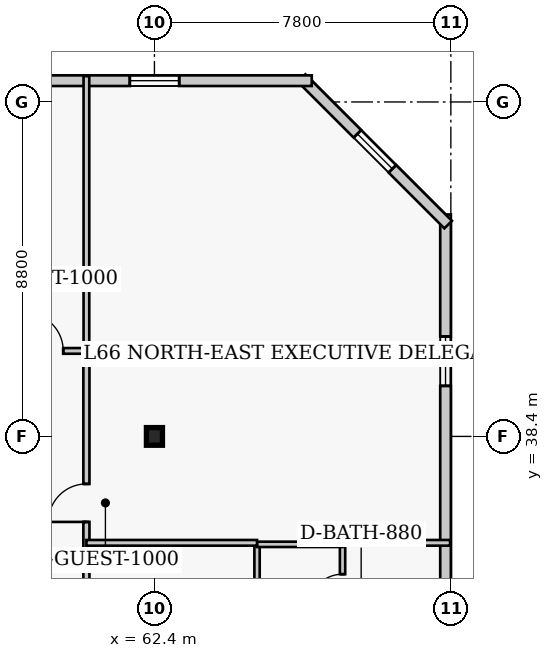
"""IFC4 building model, lengths in metres.
Left out: names, types, materials, properties, quantities, classifications, styles, units other than length and angle.
Written with IfcOpenShell. Run it as: python <this file> out.ifc"""

import sys

from ifc_helpers import new_model, si_unit, direction, frame, frame_2d, origin, origin_2d, place, context, subcontext, project, spatial, rectangle, i_section, extrude, element, fill, save


model = new_model("IFC4")
c1 = context("Model", 3, precision=1e-05, world=origin(), true_north=direction((0.0, 1.0)))
c2 = subcontext(c1, "Body", "Model", "MODEL_VIEW")
j1 = project(units=[si_unit("LENGTHUNIT", "METRE"), si_unit("PLANEANGLEUNIT", "RADIAN")], contexts=[c1])
p1 = place(None, origin())
s1 = spatial("IfcSite", under=j1, at=p1, CompositionType="ELEMENT")
p2 = place(p1, origin())
s2 = spatial("IfcBuilding", under=s1, at=p2, CompositionType="ELEMENT")
p3 = place(p2, frame((0.0, 0.0, 265.4)))
s3 = spatial("IfcBuildingStorey", under=s2, at=p3, CompositionType="ELEMENT", Elevation=265.4)
p4 = place(p3, frame((62.4, 38.4, 0.0), z_axis=(0.0, 0.0, 1.0), x_axis=(1.0, 0.0, 0.0)))
e1 = element("IfcColumn", 1, at=p4, inside=s3, PredefinedType="COLUMN", context=c2, shape_type="SweptSolid", body=[
    extrude(i_section(OverallWidth=0.422, OverallDepth=0.465, WebThickness=0.045, FlangeThickness=0.073, FilletRadius=0.017, at=origin_2d()), origin(), (0.0, 0.0, 1.0), 4.0),
])
p5 = place(p3, frame((70.06, 13.36, 0.0), z_axis=(0.0, 0.0, 1.0), x_axis=(0.0, 1.0, 0.0)))
e2 = element("IfcWall", 2, at=p5, inside=s3, PredefinedType="SOLIDWALL", context=c2, shape_type="SweptSolid", body=[
    extrude(rectangle(XDim=30.88, YDim=0.28, at=frame_2d((15.44, 0.0))), origin(), (0.0, 0.0, 1.0), 3.76),
])
p6 = place(p5, frame((3.21, 0.0, 0.85)))
e3 = element("IfcOpeningElement", 3, at=p6, cuts=e2, PredefinedType="OPENING", context=c2, shape_type="SweptSolid", body=[
    extrude(rectangle(XDim=1.3, YDim=1.7, at=frame_2d((0.65, 0.85))), frame((0.0, 0.15, 0.0), z_axis=(0.0, -1.0, 0.0), x_axis=(1.0, 0.0, 0.0)), (0.0, 0.0, 1.0), 0.3),
])
p7 = place(p5, frame((11.58, 0.0, 0.85)))
e4 = element("IfcOpeningElement", 4, at=p7, cuts=e2, PredefinedType="OPENING", context=c2, shape_type="SweptSolid", body=[
    extrude(rectangle(XDim=1.3, YDim=1.7, at=frame_2d((0.65, 0.85))), frame((0.0, 0.15, 0.0), z_axis=(0.0, -1.0, 0.0), x_axis=(1.0, 0.0, 0.0)), (0.0, 0.0, 1.0), 0.3),
])
p8 = place(p5, frame((18.65, 0.0, 0.85)))
e5 = element("IfcOpeningElement", 5, at=p8, cuts=e2, PredefinedType="OPENING", context=c2, shape_type="SweptSolid", body=[
    extrude(rectangle(XDim=1.3, YDim=1.7, at=frame_2d((0.65, 0.85))), frame((0.0, 0.15, 0.0), z_axis=(0.0, -1.0, 0.0), x_axis=(1.0, 0.0, 0.0)), (0.0, 0.0, 1.0), 0.3),
])
p9 = place(p5, frame((26.37, 0.0, 0.85)))
e6 = element("IfcOpeningElement", 6, at=p9, cuts=e2, PredefinedType="OPENING", context=c2, shape_type="SweptSolid", body=[
    extrude(rectangle(XDim=1.3, YDim=1.7, at=frame_2d((0.65, 0.85))), frame((0.0, 0.15, 0.0), z_axis=(0.0, -1.0, 0.0), x_axis=(1.0, 0.0, 0.0)), (0.0, 0.0, 1.0), 0.3),
])
p10 = place(p3, frame((70.129, 43.973, 0.0), z_axis=(0.0, 0.0, 1.0), x_axis=(-0.707106781187, 0.707106781187, 0.0)))
e7 = element("IfcWall", 7, at=p10, inside=s3, PredefinedType="SOLIDWALL", context=c2, shape_type="SweptSolid", body=[
    extrude(rectangle(XDim=5.454, YDim=0.28, at=frame_2d((2.727, 0.0))), origin(), (0.0, 0.0, 1.0), 3.76),
])
p11 = place(p10, frame((2.077, 0.0, 0.85)))
e8 = element("IfcOpeningElement", 8, at=p11, cuts=e7, PredefinedType="OPENING", context=c2, shape_type="SweptSolid", body=[
    extrude(rectangle(XDim=1.3, YDim=1.7, at=frame_2d((0.65, 0.85))), frame((0.0, 0.15, 0.0), z_axis=(0.0, -1.0, 0.0), x_axis=(1.0, 0.0, 0.0)), (0.0, 0.0, 1.0), 0.3),
])
p12 = place(p3, frame((66.54, 47.76, 0.0), z_axis=(0.0, 0.0, 1.0), x_axis=(-1.0, 0.0, 0.0)))
e9 = element("IfcWall", 9, at=p12, inside=s3, PredefinedType="SOLIDWALL", context=c2, shape_type="SweptSolid", body=[
    extrude(rectangle(XDim=24.83, YDim=0.28, at=frame_2d((12.415, 0.0))), origin(), (0.0, 0.0, 1.0), 3.76),
])
p13 = place(p12, frame((3.488, 0.0, 0.85)))
e10 = element("IfcOpeningElement", 10, at=p13, cuts=e9, PredefinedType="OPENING", context=c2, shape_type="SweptSolid", body=[
    extrude(rectangle(XDim=1.3, YDim=1.7, at=frame_2d((0.65, 0.85))), frame((0.0, 0.15, 0.0), z_axis=(0.0, -1.0, 0.0), x_axis=(1.0, 0.0, 0.0)), (0.0, 0.0, 1.0), 0.3),
])
p14 = place(p12, frame((12.915, 0.0, 0.85)))
e11 = element("IfcOpeningElement", 11, at=p14, cuts=e9, PredefinedType="OPENING", context=c2, shape_type="SweptSolid", body=[
    extrude(rectangle(XDim=1.3, YDim=1.7, at=frame_2d((0.65, 0.85))), frame((0.0, 0.15, 0.0), z_axis=(0.0, -1.0, 0.0), x_axis=(1.0, 0.0, 0.0)), (0.0, 0.0, 1.0), 0.3),
])
p15 = place(p12, frame((20.692, 0.0, 0.85)))
e12 = element("IfcOpeningElement", 12, at=p15, cuts=e9, PredefinedType="OPENING", context=c2, shape_type="SweptSolid", body=[
    extrude(rectangle(XDim=1.3, YDim=1.7, at=frame_2d((0.65, 0.85))), frame((0.0, 0.15, 0.0), z_axis=(0.0, -1.0, 0.0), x_axis=(1.0, 0.0, 0.0)), (0.0, 0.0, 1.0), 0.3),
])
p16 = place(p3, frame((60.61, 24.25, 0.0), z_axis=(0.0, 0.0, 1.0), x_axis=(0.0, 1.0, 0.0)))
e13 = element("IfcWall", 13, at=p16, inside=s3, PredefinedType="PARTITIONING", context=c2, shape_type="SweptSolid", body=[
    extrude(rectangle(XDim=16.4, YDim=0.16, at=frame_2d((8.2, 0.0))), origin(), (0.0, 0.0, 1.0), 3.76),
])
p17 = place(p16, frame((0.46, 0.0, 0.0)))
e14 = element("IfcOpeningElement", 14, at=p17, cuts=e13, PredefinedType="OPENING", context=c2, shape_type="SweptSolid", body=[
    extrude(rectangle(XDim=0.95, YDim=2.1, at=frame_2d((0.475, 1.05))), frame((0.0, 0.09, 0.0), z_axis=(0.0, -1.0, 0.0), x_axis=(1.0, 0.0, 0.0)), (0.0, 0.0, 1.0), 0.18),
])
p18 = place(p16, frame((11.9, 0.0, 0.0)))
e15 = element("IfcOpeningElement", 15, at=p18, cuts=e13, PredefinedType="OPENING", context=c2, shape_type="SweptSolid", body=[
    extrude(rectangle(XDim=1.0, YDim=2.15, at=frame_2d((0.5, 1.075))), frame((0.0, 0.09, 0.0), z_axis=(0.0, -1.0, 0.0), x_axis=(1.0, 0.0, 0.0)), (0.0, 0.0, 1.0), 0.18),
])
p19 = place(p3, frame((56.8, 40.65, 0.0), z_axis=(0.0, 0.0, 1.0), x_axis=(1.0, 0.0, 0.0)))
e16 = element("IfcWall", 16, at=p19, inside=s3, PredefinedType="PARTITIONING", context=c2, shape_type="SweptSolid", body=[
    extrude(rectangle(XDim=3.81, YDim=0.15, at=frame_2d((1.905, 0.0))), origin(), (0.0, 0.0, 1.0), 3.76),
])
p20 = place(p19, frame((2.2, 0.0, 0.0)))
e17 = element("IfcOpeningElement", 17, at=p20, cuts=e16, PredefinedType="OPENING", context=c2, shape_type="SweptSolid", body=[
    extrude(rectangle(XDim=1.0, YDim=2.15, at=frame_2d((0.5, 1.075))), frame((0.0, 0.085, 0.0), z_axis=(0.0, -1.0, 0.0), x_axis=(1.0, 0.0, 0.0)), (0.0, 0.0, 1.0), 0.17),
])
p21 = place(p3, frame((60.61, 40.65, 0.0), z_axis=(0.0, 0.0, 1.0), x_axis=(0.0, 1.0, 0.0)))
e18 = element("IfcWall", 18, at=p21, inside=s3, PredefinedType="PARTITIONING", context=c2, shape_type="SweptSolid", body=[
    extrude(rectangle(XDim=7.23, YDim=0.15, at=frame_2d((3.615, 0.0))), origin(), (0.0, 0.0, 1.0), 3.76),
])
p22 = place(p3, frame((65.1, 33.11, 0.0), z_axis=(0.0, 0.0, 1.0), x_axis=(0.0, 1.0, 0.0)))
e19 = element("IfcWall", 19, at=p22, inside=s3, PredefinedType="PLUMBINGWALL", context=c2, shape_type="SweptSolid", body=[
    extrude(rectangle(XDim=2.45, YDim=0.14, at=frame_2d((1.225, 0.0))), origin(), (0.0, 0.0, 1.0), 3.76),
])
p23 = place(p3, frame((67.35, 33.11, 0.0), z_axis=(0.0, 0.0, 1.0), x_axis=(0.0, 1.0, 0.0)))
e20 = element("IfcWall", 20, at=p23, inside=s3, PredefinedType="PLUMBINGWALL", context=c2, shape_type="SweptSolid", body=[
    extrude(rectangle(XDim=2.45, YDim=0.14, at=frame_2d((1.225, 0.0))), origin(), (0.0, 0.0, 1.0), 3.76),
])
p24 = place(p23, frame((0.785, 0.0, 0.0)))
e21 = element("IfcOpeningElement", 21, at=p24, cuts=e20, PredefinedType="OPENING", context=c2, shape_type="SweptSolid", body=[
    extrude(rectangle(XDim=0.88, YDim=2.05, at=frame_2d((0.44, 1.025))), frame((0.0, 0.08, 0.0), z_axis=(0.0, -1.0, 0.0), x_axis=(1.0, 0.0, 0.0)), (0.0, 0.0, 1.0), 0.16),
])
p25 = place(p3, frame((65.1, 35.56, 0.0), z_axis=(0.0, 0.0, 1.0), x_axis=(1.0, 0.0, 0.0)))
e22 = element("IfcWall", 22, at=p25, inside=s3, PredefinedType="PLUMBINGWALL", context=c2, shape_type="SweptSolid", body=[
    extrude(rectangle(XDim=2.25, YDim=0.14, at=frame_2d((1.125, 0.0))), origin(), (0.0, 0.0, 1.0), 3.76),
])
p26 = place(p3, frame((60.61, 35.6, 0.0), z_axis=(0.0, 0.0, 1.0), x_axis=(1.0, 0.0, 0.0)))
e23 = element("IfcWall", 23, at=p26, inside=s3, PredefinedType="PARTITIONING", context=c2, shape_type="SweptSolid", body=[
    extrude(rectangle(XDim=4.49, YDim=0.15, at=frame_2d((2.245, 0.0))), origin(), (0.0, 0.0, 1.0), 3.76),
])
p27 = place(p3, frame((67.35, 35.6, 0.0), z_axis=(0.0, 0.0, 1.0), x_axis=(1.0, 0.0, 0.0)))
e24 = element("IfcWall", 24, at=p27, inside=s3, PredefinedType="PARTITIONING", context=c2, shape_type="SweptSolid", body=[
    extrude(rectangle(XDim=2.83, YDim=0.15, at=frame_2d((1.415, 0.0))), origin(), (0.0, 0.0, 1.0), 3.76),
])
p28 = place(p9, origin())
e25 = element("IfcWindow", 25, at=p28, inside=s3, PartitioningType="SINGLE_PANEL", PredefinedType="WINDOW", context=c2, shape_type="SweptSolid", body=[
    extrude(rectangle(XDim=1.3, YDim=1.7, at=frame_2d((0.65, 0.85))), frame((0.0, 0.03, 0.0), z_axis=(0.0, -1.0, 0.0), x_axis=(1.0, 0.0, 0.0)), (0.0, 0.0, 1.0), 0.06),
])
fill(e6, e25)
p29 = place(p11, origin())
e26 = element("IfcWindow", 26, at=p29, inside=s3, PartitioningType="SINGLE_PANEL", PredefinedType="WINDOW", context=c2, shape_type="SweptSolid", body=[
    extrude(rectangle(XDim=1.3, YDim=1.7, at=frame_2d((0.65, 0.85))), frame((0.0, 0.03, 0.0), z_axis=(0.0, -1.0, 0.0), x_axis=(1.0, 0.0, 0.0)), (0.0, 0.0, 1.0), 0.06),
])
fill(e8, e26)
p30 = place(p13, origin())
e27 = element("IfcWindow", 27, at=p30, inside=s3, PartitioningType="SINGLE_PANEL", PredefinedType="WINDOW", context=c2, shape_type="SweptSolid", body=[
    extrude(rectangle(XDim=1.3, YDim=1.7, at=frame_2d((0.65, 0.85))), frame((0.0, 0.03, 0.0), z_axis=(0.0, -1.0, 0.0), x_axis=(1.0, 0.0, 0.0)), (0.0, 0.0, 1.0), 0.06),
])
fill(e10, e27)
p31 = place(p20, origin())
e28 = element("IfcDoor", 28, at=p31, inside=s3, OperationType="SINGLE_SWING_LEFT", PredefinedType="DOOR", context=c2, shape_type="SweptSolid", body=[
    extrude(rectangle(XDim=1.0, YDim=2.15, at=frame_2d((0.5, 1.075))), frame((0.0, 0.025, 0.0), z_axis=(0.0, -1.0, 0.0), x_axis=(1.0, 0.0, 0.0)), (0.0, 0.0, 1.0), 0.05),
])
fill(e17, e28)
p32 = place(p24, origin())
e29 = element("IfcDoor", 29, at=p32, inside=s3, OperationType="SINGLE_SWING_LEFT", PredefinedType="DOOR", context=c2, shape_type="SweptSolid", body=[
    extrude(rectangle(XDim=0.88, YDim=2.05, at=frame_2d((0.44, 1.025))), frame((0.0, 0.025, 0.0), z_axis=(0.0, -1.0, 0.0), x_axis=(1.0, 0.0, 0.0)), (0.0, 0.0, 1.0), 0.05),
])
fill(e21, e29)
p33 = place(p18, origin())
e30 = element("IfcDoor", 30, at=p33, inside=s3, OperationType="SINGLE_SWING_LEFT", PredefinedType="DOOR", context=c2, shape_type="SweptSolid", body=[
    extrude(rectangle(XDim=1.0, YDim=2.15, at=frame_2d((0.5, 1.075))), frame((0.0, 0.025, 0.0), z_axis=(0.0, -1.0, 0.0), x_axis=(1.0, 0.0, 0.0)), (0.0, 0.0, 1.0), 0.05),
])
fill(e15, e30)
save(model, sys.argv[1])
